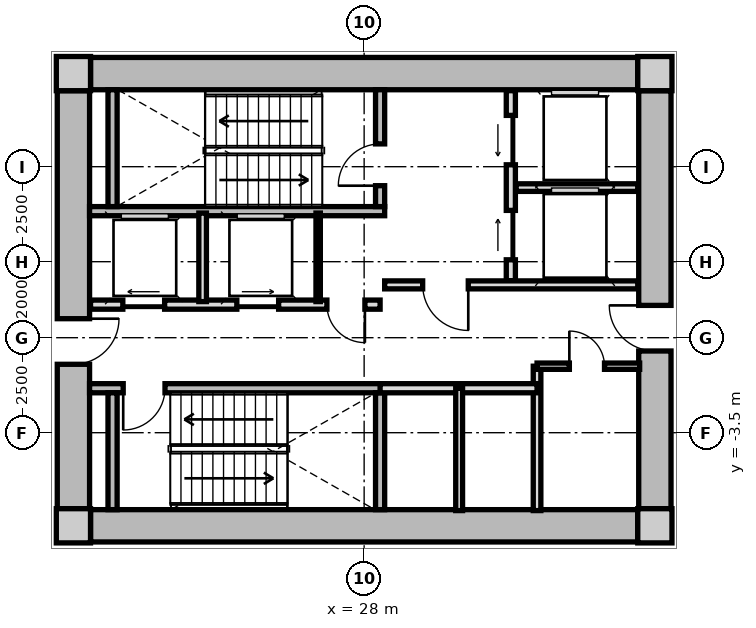
"""IFC4 building model, lengths in metres.
Left out: names, types, materials, properties, quantities, classifications, styles, units other than length and angle.
Written with IfcOpenShell. Run it as: python <this file> out.ifc"""

import sys

from ifc_helpers import new_model, si_unit, direction, frame, frame_2d, origin, origin_2d, place, context, subcontext, project, spatial, rectangle, extrude, source, transform, mapped, element, fill, save


model = new_model("IFC4")
c1 = context("Model", 3, precision=1e-05, world=origin(), true_north=direction((0.0, 1.0)))
c2 = subcontext(c1, "Body", "Model", "MODEL_VIEW")
j1 = project(units=[si_unit("LENGTHUNIT", "METRE"), si_unit("PLANEANGLEUNIT", "RADIAN")], contexts=[c1])
p1 = place(None, origin())
s1 = spatial("IfcSite", under=j1, at=p1, CompositionType="ELEMENT")
p2 = place(p1, origin())
s2 = spatial("IfcBuilding", under=s1, at=p2, CompositionType="ELEMENT")
p3 = place(p2, frame((0.0, 0.0, 4.2)))
s3 = spatial("IfcBuildingStorey", under=s2, at=p3, CompositionType="ELEMENT", Elevation=4.2)
m1 = source(origin(), c2, "Body", "SweptSolid", [
    extrude(rectangle(XDim=0.9, YDim=0.9, at=origin_2d()), origin(), (0.0, 0.0, 1.0), 4.2),
])
for number, where, z_axis, x_axis in (
    (1, (20.35, -5.95, 0.0), (0.0, 0.0, 1.0), (1.0, 0.0, 0.0)),
    (2, (35.65, -5.95, 0.0), (0.0, 0.0, 1.0), (1.0, 0.0, 0.0)),
    (3, (35.65, 5.95, 0.0), (0.0, 0.0, 1.0), (1.0, 0.0, 0.0)),
    (4, (20.35, 5.95, 0.0), (0.0, 0.0, 1.0), (1.0, 0.0, 0.0)),
):
    element("IfcColumn", number, at=place(p3, frame(where, z_axis=z_axis, x_axis=x_axis)), inside=s3, PredefinedType="COLUMN", context=c2, shape_type="MappedRepresentation", body=[
        mapped(m1, transform((0.0, 0.0, 0.0), x_axis=(1.0, 0.0, 0.0), y_axis=(0.0, 1.0, 0.0), z_axis=(0.0, 0.0, 1.0), scale=1.0)),
    ])
m2 = source(origin(), c2, "Body", "SweptSolid", [
    extrude(rectangle(XDim=14.4, YDim=0.85, at=frame_2d((7.2, 0.0))), origin(), (0.0, 0.0, 1.0), 3.88),
])
for number, where, z_axis, x_axis in (
    (5, (20.8, 5.95, 0.0), (0.0, 0.0, 1.0), (1.0, 0.0, 0.0)),
    (6, (35.2, -5.95, 0.0), (0.0, 0.0, 1.0), (-1.0, 0.0, 0.0)),
):
    element("IfcWall", number, at=place(p3, frame(where, z_axis=z_axis, x_axis=x_axis)), inside=s3, PredefinedType="SHEAR", context=c2, shape_type="MappedRepresentation", body=[
        mapped(m2, transform((0.0, 0.0, 0.0), x_axis=(1.0, 0.0, 0.0), y_axis=(0.0, 1.0, 0.0), z_axis=(0.0, 0.0, 1.0), scale=1.0)),
    ])
m3 = source(origin(), c2, "Body", "SweptSolid", [
    extrude(rectangle(XDim=11.0, YDim=0.85, at=frame_2d((5.5, 0.0))), origin(), (0.0, 0.0, 1.0), 3.88),
])
p4 = place(p3, frame((20.35, -5.5, 0.0), z_axis=(0.0, 0.0, 1.0), x_axis=(0.0, 1.0, 0.0)))
e7 = element("IfcWall", 7, at=p4, inside=s3, PredefinedType="SHEAR", context=c2, shape_type="MappedRepresentation", body=[
    mapped(m3, transform((0.0, 0.0, 0.0), x_axis=(1.0, 0.0, 0.0), y_axis=(0.0, 1.0, 0.0), z_axis=(0.0, 0.0, 1.0), scale=1.0)),
])
p5 = place(p4, frame((3.8, 0.0, 0.0)))
e8 = element("IfcOpeningElement", 8, at=p5, cuts=e7, PredefinedType="OPENING", context=c2, shape_type="SweptSolid", body=[
    extrude(rectangle(XDim=1.2, YDim=2.15, at=frame_2d((0.6, 1.075))), frame((0.0, 0.435, 0.0), z_axis=(0.0, -1.0, 0.0), x_axis=(1.0, 0.0, 0.0)), (0.0, 0.0, 1.0), 0.87),
])
p6 = place(p3, frame((35.65, 5.5, 0.0), z_axis=(0.0, 0.0, 1.0), x_axis=(0.0, -1.0, 0.0)))
e9 = element("IfcWall", 9, at=p6, inside=s3, PredefinedType="SHEAR", context=c2, shape_type="MappedRepresentation", body=[
    mapped(m3, transform((0.0, 0.0, 0.0), x_axis=(1.0, 0.0, 0.0), y_axis=(0.0, 1.0, 0.0), z_axis=(0.0, 0.0, 1.0), scale=1.0)),
])
p7 = place(p6, frame((5.65, 0.0, 0.0)))
e10 = element("IfcOpeningElement", 10, at=p7, cuts=e9, PredefinedType="OPENING", context=c2, shape_type="SweptSolid", body=[
    extrude(rectangle(XDim=1.2, YDim=2.15, at=frame_2d((0.6, 1.075))), frame((0.0, 0.435, 0.0), z_axis=(0.0, -1.0, 0.0), x_axis=(1.0, 0.0, 0.0)), (0.0, 0.0, 1.0), 0.87),
])
m4 = source(origin(), c2, "Body", "SweptSolid", [
    extrude(rectangle(XDim=7.765, YDim=0.24, at=frame_2d((3.883, 0.0))), origin(), (0.0, 0.0, 1.0), 3.88),
])
p8 = place(p3, frame((20.775, 2.33, 0.0), z_axis=(0.0, 0.0, 1.0), x_axis=(1.0, 0.0, 0.0)))
e11 = element("IfcWall", 11, at=p8, inside=s3, PredefinedType="PARTITIONING", context=c2, shape_type="MappedRepresentation", body=[
    mapped(m4, transform((0.0, 0.0, 0.0), x_axis=(1.0, 0.0, 0.0), y_axis=(0.0, 1.0, 0.0), z_axis=(0.0, 0.0, 1.0), scale=1.0)),
])
m5 = source(origin(), c2, "Body", "SweptSolid", [
    extrude(rectangle(XDim=3.075, YDim=0.24, at=frame_2d((1.538, 0.0))), origin(), (0.0, 0.0, 1.0), 3.88),
])
p9 = place(p3, frame((21.38, 2.45, 0.0), z_axis=(0.0, 0.0, 1.0), x_axis=(0.0, 1.0, 0.0)))
e12 = element("IfcWall", 12, at=p9, inside=s3, PredefinedType="PARTITIONING", context=c2, shape_type="MappedRepresentation", body=[
    mapped(m5, transform((0.0, 0.0, 0.0), x_axis=(1.0, 0.0, 0.0), y_axis=(0.0, 1.0, 0.0), z_axis=(0.0, 0.0, 1.0), scale=1.0)),
])
p10 = place(p3, frame((28.42, 2.45, 0.0), z_axis=(0.0, 0.0, 1.0), x_axis=(0.0, 1.0, 0.0)))
e13 = element("IfcWall", 13, at=p10, inside=s3, PredefinedType="PARTITIONING", context=c2, shape_type="MappedRepresentation", body=[
    mapped(m5, transform((0.0, 0.0, 0.0), x_axis=(1.0, 0.0, 0.0), y_axis=(0.0, 1.0, 0.0), z_axis=(0.0, 0.0, 1.0), scale=1.0)),
])
p11 = place(p10, frame((0.55, 0.0, 0.0)))
e14 = element("IfcOpeningElement", 14, at=p11, cuts=e13, PredefinedType="OPENING", context=c2, shape_type="SweptSolid", body=[
    extrude(rectangle(XDim=1.1, YDim=2.15, at=frame_2d((0.55, 1.075))), frame((0.0, 0.13, 0.0), z_axis=(0.0, -1.0, 0.0), x_axis=(1.0, 0.0, 0.0)), (0.0, 0.0, 1.0), 0.26),
])
p12 = place(p3, frame((20.775, -2.33, 0.0), z_axis=(0.0, 0.0, 1.0), x_axis=(1.0, 0.0, 0.0)))
e15 = element("IfcWall", 15, at=p12, inside=s3, PredefinedType="PARTITIONING", context=c2, shape_type="MappedRepresentation", body=[
    mapped(m4, transform((0.0, 0.0, 0.0), x_axis=(1.0, 0.0, 0.0), y_axis=(0.0, 1.0, 0.0), z_axis=(0.0, 0.0, 1.0), scale=1.0)),
])
p13 = place(p12, frame((0.885, 0.0, 0.0)))
e16 = element("IfcOpeningElement", 16, at=p13, cuts=e15, PredefinedType="OPENING", context=c2, shape_type="SweptSolid", body=[
    extrude(rectangle(XDim=1.1, YDim=2.15, at=frame_2d((0.55, 1.075))), frame((0.0, 0.13, 0.0), z_axis=(0.0, -1.0, 0.0), x_axis=(1.0, 0.0, 0.0)), (0.0, 0.0, 1.0), 0.26),
])
for number, where, z_axis, x_axis in (
    (17, (21.38, -5.525, 0.0), (0.0, 0.0, 1.0), (0.0, 1.0, 0.0)),
    (18, (28.42, -5.525, 0.0), (0.0, 0.0, 1.0), (0.0, 1.0, 0.0)),
):
    element("IfcWall", number, at=place(p3, frame(where, z_axis=z_axis, x_axis=x_axis)), inside=s3, PredefinedType="PARTITIONING", context=c2, shape_type="MappedRepresentation", body=[
        mapped(m5, transform((0.0, 0.0, 0.0), x_axis=(1.0, 0.0, 0.0), y_axis=(0.0, 1.0, 0.0), z_axis=(0.0, 0.0, 1.0), scale=1.0)),
    ])
m6 = source(origin(), c2, "Body", "SweptSolid", [
    extrude(rectangle(XDim=5.0, YDim=0.24, at=frame_2d((2.5, 0.0))), origin(), (0.0, 0.0, 1.0), 3.865),
])
p14 = place(p3, frame((31.86, 0.5, 0.0), z_axis=(0.0, 0.0, 1.0), x_axis=(0.0, 1.0, 0.0)))
e19 = element("IfcWall", 19, at=p14, inside=s3, PredefinedType="PARTITIONING", context=c2, shape_type="MappedRepresentation", body=[
    mapped(m6, transform((0.0, 0.0, 0.0), x_axis=(1.0, 0.0, 0.0), y_axis=(0.0, 1.0, 0.0), z_axis=(0.0, 0.0, 1.0), scale=1.0)),
])
p15 = place(p14, frame((3.05, 0.0, 0.0)))
e20 = element("IfcOpeningElement", 20, at=p15, cuts=e19, PredefinedType="OPENING", context=c2, shape_type="SweptSolid", body=[
    extrude(rectangle(XDim=1.3, YDim=2.2, at=frame_2d((0.65, 1.1))), frame((0.0, 0.13, 0.0), z_axis=(0.0, -1.0, 0.0), x_axis=(1.0, 0.0, 0.0)), (0.0, 0.0, 1.0), 0.26),
])
p16 = place(p14, frame((0.55, 0.0, 0.0)))
e21 = element("IfcOpeningElement", 21, at=p16, cuts=e19, PredefinedType="OPENING", context=c2, shape_type="SweptSolid", body=[
    extrude(rectangle(XDim=1.3, YDim=2.2, at=frame_2d((0.65, 1.1))), frame((0.0, 0.13, 0.0), z_axis=(0.0, -1.0, 0.0), x_axis=(1.0, 0.0, 0.0)), (0.0, 0.0, 1.0), 0.26),
])
m7 = source(origin(), c2, "Body", "SweptSolid", [
    extrude(rectangle(XDim=3.2, YDim=0.2, at=frame_2d((1.6, 0.0))), origin(), (0.0, 0.0, 1.0), 3.865),
])
p17 = place(p3, frame((32.0, 2.95, 0.0), z_axis=(0.0, 0.0, 1.0), x_axis=(1.0, 0.0, 0.0)))
e22 = element("IfcWall", 22, at=p17, inside=s3, PredefinedType="PARTITIONING", context=c2, shape_type="MappedRepresentation", body=[
    mapped(m7, transform((0.0, 0.0, 0.0), x_axis=(1.0, 0.0, 0.0), y_axis=(0.0, 1.0, 0.0), z_axis=(0.0, 0.0, 1.0), scale=1.0)),
])
m8 = source(origin(), c2, "Body", "SweptSolid", [
    extrude(rectangle(XDim=6.66, YDim=0.21, at=frame_2d((3.33, 0.0))), origin(), (0.0, 0.0, 1.0), 3.865),
])
p18 = place(p3, frame((28.54, 0.39, 0.0), z_axis=(0.0, 0.0, 1.0), x_axis=(1.0, 0.0, 0.0)))
e23 = element("IfcWall", 23, at=p18, inside=s3, PredefinedType="PARTITIONING", context=c2, shape_type="MappedRepresentation", body=[
    mapped(m8, transform((0.0, 0.0, 0.0), x_axis=(1.0, 0.0, 0.0), y_axis=(0.0, 1.0, 0.0), z_axis=(0.0, 0.0, 1.0), scale=1.0)),
])
p19 = place(p18, frame((1.0, 0.0, 0.0)))
e24 = element("IfcOpeningElement", 24, at=p19, cuts=e23, PredefinedType="OPENING", context=c2, shape_type="SweptSolid", body=[
    extrude(rectangle(XDim=1.2, YDim=2.15, at=frame_2d((0.6, 1.075))), frame((0.0, 0.115, 0.0), z_axis=(0.0, -1.0, 0.0), x_axis=(1.0, 0.0, 0.0)), (0.0, 0.0, 1.0), 0.23),
])
m9 = source(origin(), c2, "Body", "SweptSolid", [
    extrude(rectangle(XDim=7.62, YDim=0.24, at=frame_2d((3.81, 0.0))), origin(), (0.0, 0.0, 1.0), 3.865),
])
p20 = place(p3, frame((20.8, -0.13, 0.0), z_axis=(0.0, 0.0, 1.0), x_axis=(1.0, 0.0, 0.0)))
e25 = element("IfcWall", 25, at=p20, inside=s3, PredefinedType="PARTITIONING", context=c2, shape_type="MappedRepresentation", body=[
    mapped(m9, transform((0.0, 0.0, 0.0), x_axis=(1.0, 0.0, 0.0), y_axis=(0.0, 1.0, 0.0), z_axis=(0.0, 0.0, 1.0), scale=1.0)),
])
p21 = place(p20, frame((6.22, 0.0, 0.0)))
e26 = element("IfcOpeningElement", 26, at=p21, cuts=e25, PredefinedType="OPENING", context=c2, shape_type="SweptSolid", body=[
    extrude(rectangle(XDim=1.0, YDim=2.1, at=frame_2d((0.5, 1.05))), frame((0.0, 0.13, 0.0), z_axis=(0.0, -1.0, 0.0), x_axis=(1.0, 0.0, 0.0)), (0.0, 0.0, 1.0), 0.26),
])
p22 = place(p20, frame((0.85, 0.0, 0.0)))
e27 = element("IfcOpeningElement", 27, at=p22, cuts=e25, PredefinedType="OPENING", context=c2, shape_type="SweptSolid", body=[
    extrude(rectangle(XDim=1.1, YDim=2.2, at=frame_2d((0.55, 1.1))), frame((0.0, 0.13, 0.0), z_axis=(0.0, -1.0, 0.0), x_axis=(1.0, 0.0, 0.0)), (0.0, 0.0, 1.0), 0.26),
])
p23 = place(p20, frame((3.85, 0.0, 0.0)))
e28 = element("IfcOpeningElement", 28, at=p23, cuts=e25, PredefinedType="OPENING", context=c2, shape_type="SweptSolid", body=[
    extrude(rectangle(XDim=1.1, YDim=2.2, at=frame_2d((0.55, 1.1))), frame((0.0, 0.13, 0.0), z_axis=(0.0, -1.0, 0.0), x_axis=(1.0, 0.0, 0.0)), (0.0, 0.0, 1.0), 0.26),
])
m10 = source(origin(), c2, "Body", "SweptSolid", [
    extrude(rectangle(XDim=2.33, YDim=0.115, at=frame_2d((1.165, 0.0))), origin(), (0.0, 0.0, 1.0), 3.865),
])
p24 = place(p3, frame((26.79, -0.05, 0.0), z_axis=(0.0, 0.0, 1.0), x_axis=(0.0, 1.0, 0.0)))
e29 = element("IfcWall", 29, at=p24, inside=s3, PredefinedType="PARTITIONING", context=c2, shape_type="MappedRepresentation", body=[
    mapped(m10, transform((0.0, 0.0, 0.0), x_axis=(1.0, 0.0, 0.0), y_axis=(0.0, 1.0, 0.0), z_axis=(0.0, 0.0, 1.0), scale=1.0)),
])
m11 = source(origin(), c2, "Body", "SweptSolid", [
    extrude(rectangle(XDim=2.33, YDim=0.2, at=frame_2d((1.165, 0.0))), origin(), (0.0, 0.0, 1.0), 3.865),
])
p25 = place(p3, frame((23.75, -0.05, 0.0), z_axis=(0.0, 0.0, 1.0), x_axis=(0.0, 1.0, 0.0)))
e30 = element("IfcWall", 30, at=p25, inside=s3, PredefinedType="PARTITIONING", context=c2, shape_type="MappedRepresentation", body=[
    mapped(m11, transform((0.0, 0.0, 0.0), x_axis=(1.0, 0.0, 0.0), y_axis=(0.0, 1.0, 0.0), z_axis=(0.0, 0.0, 1.0), scale=1.0)),
])
m12 = source(origin(), c2, "Body", "SweptSolid", [
    extrude(rectangle(XDim=3.8, YDim=0.2, at=frame_2d((1.9, 0.0))), origin(), (0.0, 0.0, 1.0), 3.865),
])
p26 = place(p3, frame((32.55, -5.55, 0.0), z_axis=(0.0, 0.0, 1.0), x_axis=(0.0, 1.0, 0.0)))
e31 = element("IfcWall", 31, at=p26, inside=s3, PredefinedType="PARTITIONING", context=c2, shape_type="MappedRepresentation", body=[
    mapped(m12, transform((0.0, 0.0, 0.0), x_axis=(1.0, 0.0, 0.0), y_axis=(0.0, 1.0, 0.0), z_axis=(0.0, 0.0, 1.0), scale=1.0)),
])
m13 = source(origin(), c2, "Body", "SweptSolid", [
    extrude(rectangle(XDim=4.13, YDim=0.24, at=frame_2d((2.065, 0.0))), origin(), (0.0, 0.0, 1.0), 3.865),
])
p27 = place(p3, frame((28.42, -2.33, 0.0), z_axis=(0.0, 0.0, 1.0), x_axis=(1.0, 0.0, 0.0)))
e32 = element("IfcWall", 32, at=p27, inside=s3, PredefinedType="PARTITIONING", context=c2, shape_type="MappedRepresentation", body=[
    mapped(m13, transform((0.0, 0.0, 0.0), x_axis=(1.0, 0.0, 0.0), y_axis=(0.0, 1.0, 0.0), z_axis=(0.0, 0.0, 1.0), scale=1.0)),
])
m14 = source(origin(), c2, "Body", "SweptSolid", [
    extrude(rectangle(XDim=3.22, YDim=0.18, at=frame_2d((1.61, 0.0))), origin(), (0.0, 0.0, 1.0), 3.865),
])
p28 = place(p3, frame((30.5, -5.55, 0.0), z_axis=(0.0, 0.0, 1.0), x_axis=(0.0, 1.0, 0.0)))
e33 = element("IfcWall", 33, at=p28, inside=s3, PredefinedType="PARTITIONING", context=c2, shape_type="MappedRepresentation", body=[
    mapped(m14, transform((0.0, 0.0, 0.0), x_axis=(1.0, 0.0, 0.0), y_axis=(0.0, 1.0, 0.0), z_axis=(0.0, 0.0, 1.0), scale=1.0)),
])
m15 = source(origin(), c2, "Body", "SweptSolid", [
    extrude(rectangle(XDim=2.7, YDim=0.165, at=frame_2d((1.35, 0.0))), origin(), (0.0, 0.0, 1.0), 3.865),
])
p29 = place(p3, frame((32.55, -1.75, 0.0), z_axis=(0.0, 0.0, 1.0), x_axis=(1.0, 0.0, 0.0)))
e34 = element("IfcWall", 34, at=p29, inside=s3, PredefinedType="PARTITIONING", context=c2, shape_type="MappedRepresentation", body=[
    mapped(m15, transform((0.0, 0.0, 0.0), x_axis=(1.0, 0.0, 0.0), y_axis=(0.0, 1.0, 0.0), z_axis=(0.0, 0.0, 1.0), scale=1.0)),
])
p30 = place(p29, frame((0.85, 0.0, 0.0)))
e35 = element("IfcOpeningElement", 35, at=p30, cuts=e34, PredefinedType="OPENING", context=c2, shape_type="SweptSolid", body=[
    extrude(rectangle(XDim=0.925, YDim=2.1, at=frame_2d((0.462, 1.05))), frame((0.0, 0.093, 0.0), z_axis=(0.0, -1.0, 0.0), x_axis=(1.0, 0.0, 0.0)), (0.0, 0.0, 1.0), 0.185),
])
m16 = source(origin(), c2, "Body", "SweptSolid", [
    extrude(rectangle(XDim=1.1, YDim=2.15, at=frame_2d((0.55, 1.075))), frame((0.0, 0.025, 0.0), z_axis=(0.0, -1.0, 0.0), x_axis=(1.0, 0.0, 0.0)), (0.0, 0.0, 1.0), 0.05),
])
p31 = place(p11, origin())
e36 = element("IfcDoor", 36, at=p31, inside=s3, OperationType="SINGLE_SWING_LEFT", PredefinedType="DOOR", context=c2, shape_type="MappedRepresentation", body=[
    mapped(m16, transform((0.0, 0.0, 0.0), x_axis=(1.0, 0.0, 0.0), y_axis=(0.0, 1.0, 0.0), z_axis=(0.0, 0.0, 1.0), scale=1.0)),
])
fill(e14, e36)
p32 = place(p13, frame((1.1, 0.0, 0.0), z_axis=(0.0, 0.0, 1.0), x_axis=(-1.0, 0.0, 0.0)))
e37 = element("IfcDoor", 37, at=p32, inside=s3, OperationType="SINGLE_SWING_RIGHT", PredefinedType="DOOR", context=c2, shape_type="MappedRepresentation", body=[
    mapped(m16, transform((0.0, 0.0, 0.0), x_axis=(1.0, 0.0, 0.0), y_axis=(0.0, 1.0, 0.0), z_axis=(0.0, 0.0, 1.0), scale=1.0)),
])
fill(e16, e37)
m17 = source(origin(), c2, "Body", "SweptSolid", [
    extrude(rectangle(XDim=1.3, YDim=2.2, at=frame_2d((0.65, 1.1))), frame((0.0, 0.025, 0.0), z_axis=(0.0, -1.0, 0.0), x_axis=(1.0, 0.0, 0.0)), (0.0, 0.0, 1.0), 0.05),
])
p33 = place(p15, origin())
e38 = element("IfcDoor", 38, at=p33, inside=s3, OperationType="SLIDING_TO_LEFT", PredefinedType="DOOR", context=c2, shape_type="MappedRepresentation", body=[
    mapped(m17, transform((0.0, 0.0, 0.0), x_axis=(1.0, 0.0, 0.0), y_axis=(0.0, 1.0, 0.0), z_axis=(0.0, 0.0, 1.0), scale=1.0)),
])
fill(e20, e38)
p34 = place(p16, origin())
e39 = element("IfcDoor", 39, at=p34, inside=s3, OperationType="SLIDING_TO_RIGHT", PredefinedType="DOOR", context=c2, shape_type="MappedRepresentation", body=[
    mapped(m17, transform((0.0, 0.0, 0.0), x_axis=(1.0, 0.0, 0.0), y_axis=(0.0, 1.0, 0.0), z_axis=(0.0, 0.0, 1.0), scale=1.0)),
])
fill(e21, e39)
m18 = source(origin(), c2, "Body", "SweptSolid", [
    extrude(rectangle(XDim=1.2, YDim=2.15, at=frame_2d((0.6, 1.075))), frame((0.0, 0.025, 0.0), z_axis=(0.0, -1.0, 0.0), x_axis=(1.0, 0.0, 0.0)), (0.0, 0.0, 1.0), 0.05),
])
p35 = place(p19, frame((1.2, 0.0, 0.0), z_axis=(0.0, 0.0, 1.0), x_axis=(-1.0, 0.0, 0.0)))
e40 = element("IfcDoor", 40, at=p35, inside=s3, OperationType="SINGLE_SWING_LEFT", PredefinedType="DOOR", context=c2, shape_type="MappedRepresentation", body=[
    mapped(m18, transform((0.0, 0.0, 0.0), x_axis=(1.0, 0.0, 0.0), y_axis=(0.0, 1.0, 0.0), z_axis=(0.0, 0.0, 1.0), scale=1.0)),
])
fill(e24, e40)
p36 = place(p5, frame((1.2, 0.0, 0.0), z_axis=(0.0, 0.0, 1.0), x_axis=(-1.0, 0.0, 0.0)))
e41 = element("IfcDoor", 41, at=p36, inside=s3, OperationType="SINGLE_SWING_LEFT", PredefinedType="DOOR", context=c2, shape_type="MappedRepresentation", body=[
    mapped(m18, transform((0.0, 0.0, 0.0), x_axis=(1.0, 0.0, 0.0), y_axis=(0.0, 1.0, 0.0), z_axis=(0.0, 0.0, 1.0), scale=1.0)),
])
fill(e8, e41)
p37 = place(p7, frame((1.2, 0.0, 0.0), z_axis=(0.0, 0.0, 1.0), x_axis=(-1.0, 0.0, 0.0)))
e42 = element("IfcDoor", 42, at=p37, inside=s3, OperationType="SINGLE_SWING_RIGHT", PredefinedType="DOOR", context=c2, shape_type="MappedRepresentation", body=[
    mapped(m18, transform((0.0, 0.0, 0.0), x_axis=(1.0, 0.0, 0.0), y_axis=(0.0, 1.0, 0.0), z_axis=(0.0, 0.0, 1.0), scale=1.0)),
])
fill(e10, e42)
m19 = source(origin(), c2, "Body", "SweptSolid", [
    extrude(rectangle(XDim=1.0, YDim=2.1, at=frame_2d((0.5, 1.05))), frame((0.0, 0.025, 0.0), z_axis=(0.0, -1.0, 0.0), x_axis=(1.0, 0.0, 0.0)), (0.0, 0.0, 1.0), 0.05),
])
p38 = place(p21, frame((1.0, 0.0, 0.0), z_axis=(0.0, 0.0, 1.0), x_axis=(-1.0, 0.0, 0.0)))
e43 = element("IfcDoor", 43, at=p38, inside=s3, OperationType="SINGLE_SWING_LEFT", PredefinedType="DOOR", context=c2, shape_type="MappedRepresentation", body=[
    mapped(m19, transform((0.0, 0.0, 0.0), x_axis=(1.0, 0.0, 0.0), y_axis=(0.0, 1.0, 0.0), z_axis=(0.0, 0.0, 1.0), scale=1.0)),
])
fill(e26, e43)
m20 = source(origin(), c2, "Body", "SweptSolid", [
    extrude(rectangle(XDim=1.1, YDim=2.2, at=frame_2d((0.55, 1.1))), frame((0.0, 0.025, 0.0), z_axis=(0.0, -1.0, 0.0), x_axis=(1.0, 0.0, 0.0)), (0.0, 0.0, 1.0), 0.05),
])
p39 = place(p22, origin())
e44 = element("IfcDoor", 44, at=p39, inside=s3, OperationType="SLIDING_TO_LEFT", PredefinedType="DOOR", context=c2, shape_type="MappedRepresentation", body=[
    mapped(m20, transform((0.0, 0.0, 0.0), x_axis=(1.0, 0.0, 0.0), y_axis=(0.0, 1.0, 0.0), z_axis=(0.0, 0.0, 1.0), scale=1.0)),
])
fill(e27, e44)
p40 = place(p23, origin())
e45 = element("IfcDoor", 45, at=p40, inside=s3, OperationType="SLIDING_TO_RIGHT", PredefinedType="DOOR", context=c2, shape_type="MappedRepresentation", body=[
    mapped(m20, transform((0.0, 0.0, 0.0), x_axis=(1.0, 0.0, 0.0), y_axis=(0.0, 1.0, 0.0), z_axis=(0.0, 0.0, 1.0), scale=1.0)),
])
fill(e28, e45)
m21 = source(origin(), c2, "Body", "SweptSolid", [
    extrude(rectangle(XDim=0.925, YDim=2.1, at=frame_2d((0.462, 1.05))), frame((0.0, 0.025, 0.0), z_axis=(0.0, -1.0, 0.0), x_axis=(1.0, 0.0, 0.0)), (0.0, 0.0, 1.0), 0.05),
])
p41 = place(p30, origin())
e46 = element("IfcDoor", 46, at=p41, inside=s3, OperationType="SINGLE_SWING_LEFT", PredefinedType="DOOR", context=c2, shape_type="MappedRepresentation", body=[
    mapped(m21, transform((0.0, 0.0, 0.0), x_axis=(1.0, 0.0, 0.0), y_axis=(0.0, 1.0, 0.0), z_axis=(0.0, 0.0, 1.0), scale=1.0)),
])
fill(e35, e46)
save(model, sys.argv[1])
